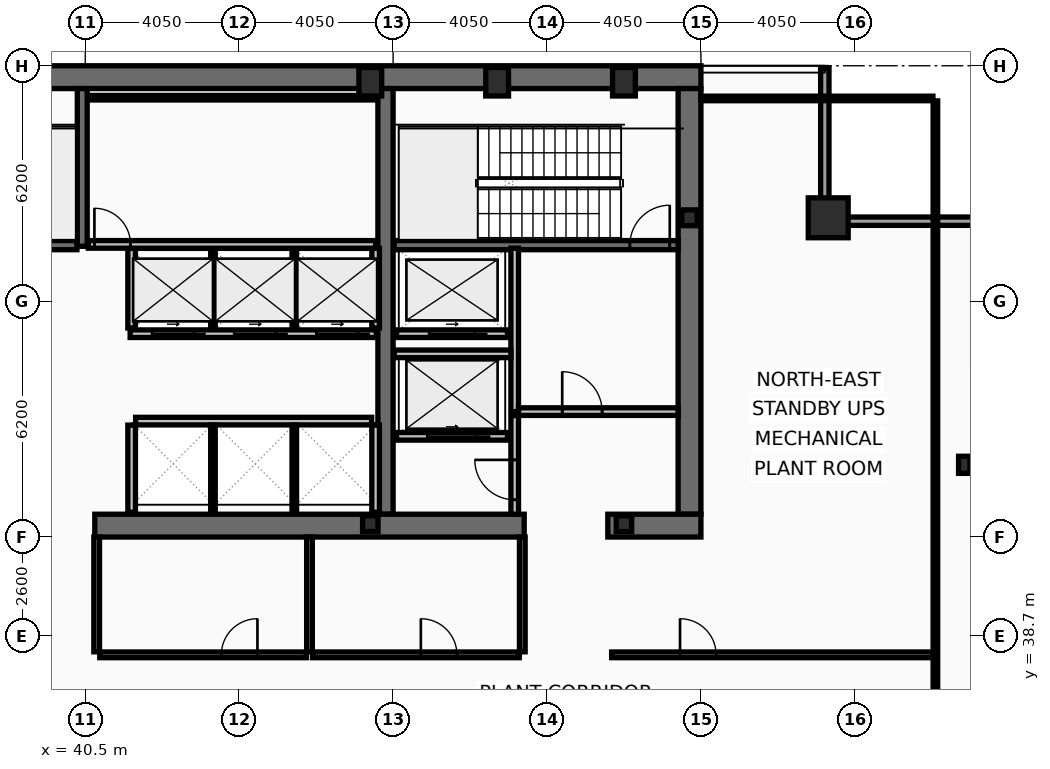
"""IFC4 building model, lengths in metres.
Left out: names, types, materials, properties, quantities, classifications, styles, units other than length and angle.
Written with IfcOpenShell. Run it as: python <this file> out.ifc"""

import sys

from ifc_helpers import new_model, si_unit, direction, frame, frame_2d, origin, origin_2d, place, context, subcontext, project, spatial, rectangle, hollow_rectangle, i_section, extrude, element, fill, save


model = new_model("IFC4")
c1 = context("Model", 3, precision=1e-05, world=origin(), true_north=direction((0.0, 1.0)))
c2 = subcontext(c1, "Body", "Model", "MODEL_VIEW")
j1 = project(units=[si_unit("LENGTHUNIT", "METRE"), si_unit("PLANEANGLEUNIT", "RADIAN")], contexts=[c1])
p1 = place(None, origin())
s1 = spatial("IfcSite", under=j1, at=p1, CompositionType="ELEMENT")
p2 = place(p1, origin())
s2 = spatial("IfcBuilding", under=s1, at=p2, CompositionType="ELEMENT")
p3 = place(p2, frame((0.0, 0.0, 257.0)))
s3 = spatial("IfcBuildingStorey", under=s2, at=p3, CompositionType="ELEMENT", Elevation=257.0)
p4 = place(p3, frame((16.2, 53.4, 0.0), z_axis=(0.0, 0.0, 1.0), x_axis=(1.0, 0.0, 0.0)))
e1 = element("IfcWall", 1, at=p4, inside=s3, PredefinedType="SHEAR", context=c2, shape_type="SweptSolid", body=[
    extrude(rectangle(XDim=40.5, YDim=0.6, at=frame_2d((20.25, 0.0))), origin(), (0.0, 0.0, 1.0), 4.64),
])
p5 = place(p3, frame((56.4, 53.1, 0.0), z_axis=(0.0, 0.0, 1.0), x_axis=(0.0, -1.0, 0.0)))
e2 = element("IfcWall", 2, at=p5, inside=s3, PredefinedType="SHEAR", context=c2, shape_type="SweptSolid", body=[
    extrude(rectangle(XDim=11.2, YDim=0.6, at=frame_2d((5.6, 0.0))), origin(), (0.0, 0.0, 1.0), 4.64),
])
p6 = place(p3, frame((48.4, 41.9, 0.0), z_axis=(0.0, 0.0, 1.0), x_axis=(0.0, 1.0, 0.0)))
e3 = element("IfcWall", 3, at=p6, inside=s3, PredefinedType="SHEAR", context=c2, shape_type="SweptSolid", body=[
    extrude(rectangle(XDim=11.2, YDim=0.4, at=frame_2d((5.6, 0.0))), origin(), (0.0, 0.0, 1.0), 4.64),
])
p7 = place(p3, frame((52.05, 41.6, 0.0), z_axis=(0.0, 0.0, 1.0), x_axis=(-1.0, 0.0, 0.0)))
e4 = element("IfcWall", 4, at=p7, inside=s3, PredefinedType="SHEAR", context=c2, shape_type="SweptSolid", body=[
    extrude(rectangle(XDim=11.3, YDim=0.6, at=frame_2d((5.65, 0.0))), origin(), (0.0, 0.0, 1.0), 4.64),
])
p8 = place(p3, frame((56.7, 41.6, 0.0), z_axis=(0.0, 0.0, 1.0), x_axis=(-1.0, 0.0, 0.0)))
e5 = element("IfcWall", 5, at=p8, inside=s3, PredefinedType="SHEAR", context=c2, shape_type="SweptSolid", body=[
    extrude(rectangle(XDim=2.45, YDim=0.6, at=frame_2d((1.225, 0.0))), origin(), (0.0, 0.0, 1.0), 4.64),
])
p9 = place(p3, frame((40.42, 48.95, 0.0), z_axis=(0.0, 0.0, 1.0), x_axis=(0.0, 1.0, 0.0)))
e6 = element("IfcWall", 6, at=p9, inside=s3, PredefinedType="SHEAR", context=c2, shape_type="SweptSolid", body=[
    extrude(rectangle(XDim=4.15, YDim=0.26, at=frame_2d((2.075, 0.0))), origin(), (0.0, 0.0, 1.0), 4.64),
])
p10 = place(p3, frame((48.63, 48.98, 0.0), z_axis=(0.0, 0.0, 1.0), x_axis=(1.0, 0.0, 0.0)))
e7 = element("IfcWall", 7, at=p10, inside=s3, PredefinedType="SHEAR", context=c2, shape_type="SweptSolid", body=[
    extrude(rectangle(XDim=7.47, YDim=0.24, at=frame_2d((3.735, 0.0))), origin(), (0.0, 0.0, 1.0), 4.64),
])
p11 = place(p10, frame((6.2, 0.0, 0.0)))
e8 = element("IfcOpeningElement", 8, at=p11, cuts=e7, PredefinedType="OPENING", context=c2, shape_type="SweptSolid", body=[
    extrude(rectangle(XDim=1.05, YDim=2.15, at=frame_2d((0.525, 1.075))), frame((0.0, 0.13, 0.0), z_axis=(0.0, -1.0, 0.0), x_axis=(1.0, 0.0, 0.0)), (0.0, 0.0, 1.0), 0.26),
])
p12 = place(p3, frame((32.72, 48.98, 0.0), z_axis=(0.0, 0.0, 1.0), x_axis=(1.0, 0.0, 0.0)))
e9 = element("IfcWall", 9, at=p12, inside=s3, PredefinedType="SHEAR", context=c2, shape_type="SweptSolid", body=[
    extrude(rectangle(XDim=7.56, YDim=0.24, at=frame_2d((3.78, 0.0))), origin(), (0.0, 0.0, 1.0), 4.64),
])
p13 = place(p12, frame((0.22, 0.0, 0.0)))
e10 = element("IfcOpeningElement", 10, at=p13, cuts=e9, PredefinedType="OPENING", context=c2, shape_type="SweptSolid", body=[
    extrude(rectangle(XDim=1.05, YDim=2.15, at=frame_2d((0.525, 1.075))), frame((0.0, 0.13, 0.0), z_axis=(0.0, -1.0, 0.0), x_axis=(1.0, 0.0, 0.0)), (0.0, 0.0, 1.0), 0.26),
])
p14 = place(p3, frame((60.05, 49.7, 0.0), z_axis=(0.0, 0.0, 1.0), x_axis=(1.0, 0.0, 0.0)))
e11 = element("IfcColumn", 11, at=p14, inside=s3, PredefinedType="COLUMN", context=c2, shape_type="SweptSolid", body=[
    extrude(hollow_rectangle(XDim=1.05, YDim=1.05, WallThickness=0.055, at=origin_2d()), origin(), (0.0, 0.0, 1.0), 4.8),
])
for number, where, z_axis, x_axis in (
    (12, (48.0, 53.28, 0.0), (0.0, 0.0, 1.0), (1.0, 0.0, 0.0)),
    (13, (51.337, 53.28, 0.0), (0.0, 0.0, 1.0), (1.0, 0.0, 0.0)),
    (14, (54.675, 53.28, 0.0), (0.0, 0.0, 1.0), (1.0, 0.0, 0.0)),
):
    element("IfcColumn", number, at=place(p3, frame(where, z_axis=z_axis, x_axis=x_axis)), inside=s3, PredefinedType="COLUMN", context=c2, shape_type="SweptSolid", body=[
        extrude(hollow_rectangle(XDim=0.6, YDim=0.75, WallThickness=0.045, at=origin_2d()), origin(), (0.0, 0.0, 1.0), 4.8),
    ])
p15 = place(p3, frame((63.63, 43.2, 0.0), z_axis=(0.0, 0.0, 1.0), x_axis=(1.0, 0.0, 0.0)))
e15 = element("IfcColumn", 15, at=p15, inside=s3, PredefinedType="COLUMN", context=c2, shape_type="SweptSolid", body=[
    extrude(i_section(OverallWidth=0.3, OverallDepth=0.45, WebThickness=0.014, FlangeThickness=0.026, at=origin_2d()), origin(), (0.0, 0.0, 1.0), 4.8),
])
for number, where, z_axis, x_axis in (
    (16, (56.4, 49.7, 0.0), (0.0, 0.0, 1.0), (1.0, 0.0, 0.0)),
    (17, (48.0, 41.65, 0.0), (0.0, 0.0, 1.0), (1.0, 0.0, 0.0)),
    (18, (54.675, 41.65, 0.0), (0.0, 0.0, 1.0), (1.0, 0.0, 0.0)),
):
    element("IfcColumn", number, at=place(p3, frame(where, z_axis=z_axis, x_axis=x_axis)), inside=s3, PredefinedType="COLUMN", context=c2, shape_type="SweptSolid", body=[
        extrude(i_section(OverallWidth=0.406, OverallDepth=0.416, WebThickness=0.03, FlangeThickness=0.048, at=origin_2d()), origin(), (0.0, 0.0, 1.0), 4.8),
    ])
p16 = place(p3, frame((59.96, 53.63, 0.0), z_axis=(0.0, 0.0, 1.0), x_axis=(0.0, -1.0, 0.0)))
e19 = element("IfcWall", 19, at=p16, inside=s3, PredefinedType="SOLIDWALL", context=c2, shape_type="SweptSolid", body=[
    extrude(rectangle(XDim=3.91, YDim=0.22, at=frame_2d((1.955, 0.0))), origin(), (0.0, 0.0, 1.0), 4.03),
])
p17 = place(p3, frame((59.85, 49.61, 0.0), z_axis=(0.0, 0.0, 1.0), x_axis=(1.0, 0.0, 0.0)))
e20 = element("IfcWall", 20, at=p17, inside=s3, PredefinedType="SOLIDWALL", context=c2, shape_type="SweptSolid", body=[
    extrude(rectangle(XDim=4.22, YDim=0.22, at=frame_2d((2.11, 0.0))), origin(), (0.0, 0.0, 1.0), 4.03),
])
p18 = place(p3, frame((51.61, 43.95, 0.0), z_axis=(0.0, 0.0, 1.0), x_axis=(-1.0, 0.0, 0.0)))
e21 = element("IfcWall", 21, at=p18, inside=s3, PredefinedType="PARTITIONING", context=c2, shape_type="SweptSolid", body=[
    extrude(rectangle(XDim=2.92, YDim=0.2, at=frame_2d((1.46, 0.0))), origin(), (0.0, 0.0, 1.0), 4.64),
])
p19 = place(p18, frame((0.81, 0.0, 0.0)))
e22 = element("IfcOpeningElement", 22, at=p19, cuts=e21, PredefinedType="OPENING", context=c2, shape_type="SweptSolid", body=[
    extrude(rectangle(XDim=1.3, YDim=2.18, at=frame_2d((0.65, 1.09))), frame((0.0, 0.11, 0.0), z_axis=(0.0, -1.0, 0.0), x_axis=(1.0, 0.0, 0.0)), (0.0, 0.0, 1.0), 0.22),
])
p20 = place(p3, frame((51.61, 46.65, 0.0), z_axis=(0.0, 0.0, 1.0), x_axis=(-1.0, 0.0, 0.0)))
e23 = element("IfcWall", 23, at=p20, inside=s3, PredefinedType="PARTITIONING", context=c2, shape_type="SweptSolid", body=[
    extrude(rectangle(XDim=2.92, YDim=0.2, at=frame_2d((1.46, 0.0))), origin(), (0.0, 0.0, 1.0), 4.64),
])
p21 = place(p20, frame((0.86, 0.0, 0.0)))
e24 = element("IfcOpeningElement", 24, at=p21, cuts=e23, PredefinedType="OPENING", context=c2, shape_type="SweptSolid", body=[
    extrude(rectangle(XDim=1.2, YDim=2.18, at=frame_2d((0.6, 1.09))), frame((0.0, 0.11, 0.0), z_axis=(0.0, -1.0, 0.0), x_axis=(1.0, 0.0, 0.0)), (0.0, 0.0, 1.0), 0.22),
])
p22 = place(p3, frame((48.16, 46.65, 0.0), z_axis=(0.0, 0.0, 1.0), x_axis=(-1.0, 0.0, 0.0)))
e25 = element("IfcWall", 25, at=p22, inside=s3, PredefinedType="PARTITIONING", context=c2, shape_type="SweptSolid", body=[
    extrude(rectangle(XDim=6.48, YDim=0.2, at=frame_2d((3.24, 0.0))), origin(), (0.0, 0.0, 1.0), 4.64),
])
p23 = place(p22, frame((4.8, 0.0, 0.0)))
e26 = element("IfcOpeningElement", 26, at=p23, cuts=e25, PredefinedType="OPENING", context=c2, shape_type="SweptSolid", body=[
    extrude(rectangle(XDim=1.1, YDim=2.18, at=frame_2d((0.55, 1.09))), frame((0.0, 0.11, 0.0), z_axis=(0.0, -1.0, 0.0), x_axis=(1.0, 0.0, 0.0)), (0.0, 0.0, 1.0), 0.22),
])
p24 = place(p22, frame((2.64, 0.0, 0.0)))
e27 = element("IfcOpeningElement", 27, at=p24, cuts=e25, PredefinedType="OPENING", context=c2, shape_type="SweptSolid", body=[
    extrude(rectangle(XDim=1.1, YDim=2.18, at=frame_2d((0.55, 1.09))), frame((0.0, 0.11, 0.0), z_axis=(0.0, -1.0, 0.0), x_axis=(1.0, 0.0, 0.0)), (0.0, 0.0, 1.0), 0.22),
])
p25 = place(p22, frame((0.48, 0.0, 0.0)))
e28 = element("IfcOpeningElement", 28, at=p25, cuts=e25, PredefinedType="OPENING", context=c2, shape_type="SweptSolid", body=[
    extrude(rectangle(XDim=1.1, YDim=2.18, at=frame_2d((0.55, 1.09))), frame((0.0, 0.11, 0.0), z_axis=(0.0, -1.0, 0.0), x_axis=(1.0, 0.0, 0.0)), (0.0, 0.0, 1.0), 0.22),
])
p26 = place(p3, frame((51.8, 44.6, 0.0), z_axis=(0.0, 0.0, 1.0), x_axis=(0.0, 1.0, 0.0)))
e29 = element("IfcWall", 29, at=p26, inside=s3, PredefinedType="PARTITIONING", context=c2, shape_type="SweptSolid", body=[
    extrude(rectangle(XDim=4.3, YDim=0.2, at=frame_2d((2.15, 0.0))), origin(), (0.0, 0.0, 1.0), 4.64),
])
p27 = place(p3, frame((51.9, 44.6, 0.0), z_axis=(0.0, 0.0, 1.0), x_axis=(1.0, 0.0, 0.0)))
e30 = element("IfcWall", 30, at=p27, inside=s3, PredefinedType="PARTITIONING", context=c2, shape_type="SweptSolid", body=[
    extrude(rectangle(XDim=4.2, YDim=0.2, at=frame_2d((2.1, 0.0))), origin(), (0.0, 0.0, 1.0), 4.64),
])
p28 = place(p27, frame((1.15, 0.0, 0.0)))
e31 = element("IfcOpeningElement", 31, at=p28, cuts=e30, PredefinedType="OPENING", context=c2, shape_type="SweptSolid", body=[
    extrude(rectangle(XDim=1.05, YDim=2.15, at=frame_2d((0.525, 1.075))), frame((0.0, 0.11, 0.0), z_axis=(0.0, -1.0, 0.0), x_axis=(1.0, 0.0, 0.0)), (0.0, 0.0, 1.0), 0.22),
])
p29 = place(p3, frame((48.63, 46.12, 0.0), z_axis=(0.0, 0.0, 1.0), x_axis=(1.0, 0.0, 0.0)))
e32 = element("IfcWall", 32, at=p29, inside=s3, PredefinedType="PARTITIONING", context=c2, shape_type="SweptSolid", body=[
    extrude(rectangle(XDim=3.07, YDim=0.2, at=frame_2d((1.535, 0.0))), origin(), (0.0, 0.0, 1.0), 4.64),
])
p30 = place(p3, frame((51.8, 41.9, 0.0), z_axis=(0.0, 0.0, 1.0), x_axis=(0.0, 1.0, 0.0)))
e33 = element("IfcWall", 33, at=p30, inside=s3, PredefinedType="PARTITIONING", context=c2, shape_type="SweptSolid", body=[
    extrude(rectangle(XDim=2.595, YDim=0.2, at=frame_2d((1.298, 0.0))), origin(), (0.0, 0.0, 1.0), 4.64),
])
p31 = place(p30, frame((0.38, 0.0, 0.0)))
e34 = element("IfcOpeningElement", 34, at=p31, cuts=e33, PredefinedType="OPENING", context=c2, shape_type="SweptSolid", body=[
    extrude(rectangle(XDim=1.05, YDim=2.15, at=frame_2d((0.525, 1.075))), frame((0.0, 0.11, 0.0), z_axis=(0.0, -1.0, 0.0), x_axis=(1.0, 0.0, 0.0)), (0.0, 0.0, 1.0), 0.22),
])
for number, where, z_axis, x_axis in (
    (35, (41.72, 46.8, 0.0), (0.0, 0.0, 1.0), (0.0, 1.0, 0.0)),
    (36, (48.14, 46.8, 0.0), (0.0, 0.0, 1.0), (0.0, 1.0, 0.0)),
):
    element("IfcWall", number, at=place(p3, frame(where, z_axis=z_axis, x_axis=x_axis)), inside=s3, PredefinedType="PARTITIONING", context=c2, shape_type="SweptSolid", body=[
        extrude(rectangle(XDim=2.095, YDim=0.2, at=frame_2d((1.047, 0.0))), origin(), (0.0, 0.0, 1.0), 4.64),
    ])
for number, where, z_axis, x_axis in (
    (37, (43.86, 46.8, 0.0), (0.0, 0.0, 1.0), (0.0, 1.0, 0.0)),
    (38, (46.0, 46.8, 0.0), (0.0, 0.0, 1.0), (0.0, 1.0, 0.0)),
):
    element("IfcWall", number, at=place(p3, frame(where, z_axis=z_axis, x_axis=x_axis)), inside=s3, PredefinedType="PARTITIONING", context=c2, shape_type="SweptSolid", body=[
        extrude(rectangle(XDim=2.095, YDim=0.12, at=frame_2d((1.047, 0.0))), origin(), (0.0, 0.0, 1.0), 4.64),
    ])
p32 = place(p3, frame((41.825, 44.35, 0.0), z_axis=(0.0, 0.0, 1.0), x_axis=(1.0, 0.0, 0.0)))
e39 = element("IfcWall", 39, at=p32, inside=s3, PredefinedType="PARTITIONING", context=c2, shape_type="SweptSolid", body=[
    extrude(rectangle(XDim=6.21, YDim=0.2, at=frame_2d((3.105, 0.0))), origin(), (0.0, 0.0, 1.0), 4.64),
])
for number, where, z_axis, x_axis in (
    (40, (41.72, 41.95, 0.0), (0.0, 0.0, 1.0), (0.0, 1.0, 0.0)),
    (41, (48.14, 41.95, 0.0), (0.0, 0.0, 1.0), (0.0, 1.0, 0.0)),
):
    element("IfcWall", number, at=place(p3, frame(where, z_axis=z_axis, x_axis=x_axis)), inside=s3, PredefinedType="PARTITIONING", context=c2, shape_type="SweptSolid", body=[
        extrude(rectangle(XDim=2.295, YDim=0.2, at=frame_2d((1.147, 0.0))), origin(), (0.0, 0.0, 1.0), 4.64),
    ])
for number, where, z_axis, x_axis in (
    (42, (43.86, 41.95, 0.0), (0.0, 0.0, 1.0), (0.0, 1.0, 0.0)),
    (43, (46.0, 41.95, 0.0), (0.0, 0.0, 1.0), (0.0, 1.0, 0.0)),
):
    element("IfcWall", number, at=place(p3, frame(where, z_axis=z_axis, x_axis=x_axis)), inside=s3, PredefinedType="PARTITIONING", context=c2, shape_type="SweptSolid", body=[
        extrude(rectangle(XDim=2.295, YDim=0.12, at=frame_2d((1.147, 0.0))), origin(), (0.0, 0.0, 1.0), 4.64),
    ])
p33 = place(p3, frame((40.58, 52.86, 0.0), z_axis=(0.0, 0.0, 1.0), x_axis=(1.0, 0.0, 0.0)))
e44 = element("IfcWall", 44, at=p33, inside=s3, PredefinedType="PARTITIONING", context=c2, shape_type="SweptSolid", body=[
    extrude(rectangle(XDim=7.56, YDim=0.12, at=frame_2d((3.78, 0.0))), origin(), (0.0, 0.0, 1.0), 4.64),
])
p34 = place(p3, frame((40.58, 49.0, 0.0), z_axis=(0.0, 0.0, 1.0), x_axis=(1.0, 0.0, 0.0)))
e45 = element("IfcWall", 45, at=p34, inside=s3, PredefinedType="PARTITIONING", context=c2, shape_type="SweptSolid", body=[
    extrude(rectangle(XDim=7.56, YDim=0.2, at=frame_2d((3.78, 0.0))), origin(), (0.0, 0.0, 1.0), 4.64),
])
p35 = place(p34, frame((0.16, 0.0, 0.0)))
e46 = element("IfcOpeningElement", 46, at=p35, cuts=e45, PredefinedType="OPENING", context=c2, shape_type="SweptSolid", body=[
    extrude(rectangle(XDim=0.95, YDim=2.1, at=frame_2d((0.475, 1.05))), frame((0.0, 0.11, 0.0), z_axis=(0.0, -1.0, 0.0), x_axis=(1.0, 0.0, 0.0)), (0.0, 0.0, 1.0), 0.22),
])
p36 = place(p3, frame((40.88, 38.2, 0.0), z_axis=(0.0, 0.0, 1.0), x_axis=(1.0, 0.0, 0.0)))
e47 = element("IfcWall", 47, at=p36, inside=s3, PredefinedType="PARTITIONING", context=c2, shape_type="SweptSolid", body=[
    extrude(rectangle(XDim=5.44, YDim=0.15, at=frame_2d((2.72, 0.0))), origin(), (0.0, 0.0, 1.0), 3.98),
])
p37 = place(p36, frame((3.2, 0.0, 0.0)))
e48 = element("IfcOpeningElement", 48, at=p37, cuts=e47, PredefinedType="OPENING", context=c2, shape_type="SweptSolid", body=[
    extrude(rectangle(XDim=0.95, YDim=2.1, at=frame_2d((0.475, 1.05))), frame((0.0, 0.085, 0.0), z_axis=(0.0, -1.0, 0.0), x_axis=(1.0, 0.0, 0.0)), (0.0, 0.0, 1.0), 0.17),
])
p38 = place(p3, frame((46.48, 38.2, 0.0), z_axis=(0.0, 0.0, 1.0), x_axis=(1.0, 0.0, 0.0)))
e49 = element("IfcWall", 49, at=p38, inside=s3, PredefinedType="PARTITIONING", context=c2, shape_type="SweptSolid", body=[
    extrude(rectangle(XDim=5.44, YDim=0.15, at=frame_2d((2.72, 0.0))), origin(), (0.0, 0.0, 1.0), 3.98),
])
p39 = place(p38, frame((2.85, 0.0, 0.0)))
e50 = element("IfcOpeningElement", 50, at=p39, cuts=e49, PredefinedType="OPENING", context=c2, shape_type="SweptSolid", body=[
    extrude(rectangle(XDim=0.95, YDim=2.1, at=frame_2d((0.475, 1.05))), frame((0.0, 0.085, 0.0), z_axis=(0.0, -1.0, 0.0), x_axis=(1.0, 0.0, 0.0)), (0.0, 0.0, 1.0), 0.17),
])
for number, where, z_axis, x_axis in (
    (51, (40.8, 38.28, 0.0), (0.0, 0.0, 1.0), (0.0, 1.0, 0.0)),
    (52, (46.4, 38.28, 0.0), (0.0, 0.0, 1.0), (0.0, 1.0, 0.0)),
    (53, (52.0, 38.28, 0.0), (0.0, 0.0, 1.0), (0.0, 1.0, 0.0)),
):
    element("IfcWall", number, at=place(p3, frame(where, z_axis=z_axis, x_axis=x_axis)), inside=s3, PredefinedType="PARTITIONING", context=c2, shape_type="SweptSolid", body=[
        extrude(rectangle(XDim=3.02, YDim=0.15, at=frame_2d((1.51, 0.0))), origin(), (0.0, 0.0, 1.0), 4.64),
    ])
p40 = place(p3, frame((54.35, 38.2, 0.0), z_axis=(0.0, 0.0, 1.0), x_axis=(1.0, 0.0, 0.0)))
e54 = element("IfcWall", 54, at=p40, inside=s3, PredefinedType="PARTITIONING", context=c2, shape_type="SweptSolid", body=[
    extrude(rectangle(XDim=8.455, YDim=0.15, at=frame_2d((4.228, 0.0))), origin(), (0.0, 0.0, 1.0), 3.98),
])
p41 = place(p40, frame((1.8, 0.0, 0.0)))
e55 = element("IfcOpeningElement", 55, at=p41, cuts=e54, PredefinedType="OPENING", context=c2, shape_type="SweptSolid", body=[
    extrude(rectangle(XDim=0.95, YDim=2.1, at=frame_2d((0.475, 1.05))), frame((0.0, 0.085, 0.0), z_axis=(0.0, -1.0, 0.0), x_axis=(1.0, 0.0, 0.0)), (0.0, 0.0, 1.0), 0.17),
])
p42 = place(p3, frame((62.87, 10.665, 0.0), z_axis=(0.0, 0.0, 1.0), x_axis=(0.0, 1.0, 0.0)))
e56 = element("IfcWall", 56, at=p42, inside=s3, PredefinedType="PARTITIONING", context=c2, shape_type="SweptSolid", body=[
    extrude(rectangle(XDim=42.11, YDim=0.12, at=frame_2d((21.055, 0.0))), origin(), (0.0, 0.0, 1.0), 3.98),
])
p43 = place(p3, frame((56.7, 52.84, 0.0), z_axis=(0.0, 0.0, 1.0), x_axis=(1.0, 0.0, 0.0)))
e57 = element("IfcWall", 57, at=p43, inside=s3, PredefinedType="PARTITIONING", context=c2, shape_type="SweptSolid", body=[
    extrude(rectangle(XDim=6.105, YDim=0.12, at=frame_2d((3.052, 0.0))), origin(), (0.0, 0.0, 1.0), 4.64),
])
p44 = place(p11, origin())
e58 = element("IfcDoor", 58, at=p44, inside=s3, OperationType="SINGLE_SWING_RIGHT", PredefinedType="DOOR", context=c2, shape_type="SweptSolid", body=[
    extrude(rectangle(XDim=1.05, YDim=2.15, at=frame_2d((0.525, 1.075))), frame((0.0, 0.025, 0.0), z_axis=(0.0, -1.0, 0.0), x_axis=(1.0, 0.0, 0.0)), (0.0, 0.0, 1.0), 0.05),
])
fill(e8, e58)
p45 = place(p19, origin())
e59 = element("IfcDoor", 59, at=p45, inside=s3, OperationType="SLIDING_TO_LEFT", PredefinedType="DOOR", context=c2, shape_type="SweptSolid", body=[
    extrude(rectangle(XDim=1.3, YDim=2.18, at=frame_2d((0.65, 1.09))), frame((0.0, 0.025, 0.0), z_axis=(0.0, -1.0, 0.0), x_axis=(1.0, 0.0, 0.0)), (0.0, 0.0, 1.0), 0.05),
])
fill(e22, e59)
p46 = place(p21, origin())
e60 = element("IfcDoor", 60, at=p46, inside=s3, OperationType="SLIDING_TO_LEFT", PredefinedType="DOOR", context=c2, shape_type="SweptSolid", body=[
    extrude(rectangle(XDim=1.2, YDim=2.18, at=frame_2d((0.6, 1.09))), frame((0.0, 0.025, 0.0), z_axis=(0.0, -1.0, 0.0), x_axis=(1.0, 0.0, 0.0)), (0.0, 0.0, 1.0), 0.05),
])
fill(e24, e60)
p47 = place(p23, origin())
e61 = element("IfcDoor", 61, at=p47, inside=s3, OperationType="SLIDING_TO_LEFT", PredefinedType="DOOR", context=c2, shape_type="SweptSolid", body=[
    extrude(rectangle(XDim=1.1, YDim=2.18, at=frame_2d((0.55, 1.09))), frame((0.0, 0.025, 0.0), z_axis=(0.0, -1.0, 0.0), x_axis=(1.0, 0.0, 0.0)), (0.0, 0.0, 1.0), 0.05),
])
fill(e26, e61)
p48 = place(p24, origin())
e62 = element("IfcDoor", 62, at=p48, inside=s3, OperationType="SLIDING_TO_LEFT", PredefinedType="DOOR", context=c2, shape_type="SweptSolid", body=[
    extrude(rectangle(XDim=1.1, YDim=2.18, at=frame_2d((0.55, 1.09))), frame((0.0, 0.025, 0.0), z_axis=(0.0, -1.0, 0.0), x_axis=(1.0, 0.0, 0.0)), (0.0, 0.0, 1.0), 0.05),
])
fill(e27, e62)
p49 = place(p25, origin())
e63 = element("IfcDoor", 63, at=p49, inside=s3, OperationType="SLIDING_TO_LEFT", PredefinedType="DOOR", context=c2, shape_type="SweptSolid", body=[
    extrude(rectangle(XDim=1.1, YDim=2.18, at=frame_2d((0.55, 1.09))), frame((0.0, 0.025, 0.0), z_axis=(0.0, -1.0, 0.0), x_axis=(1.0, 0.0, 0.0)), (0.0, 0.0, 1.0), 0.05),
])
fill(e28, e63)
p50 = place(p28, origin())
e64 = element("IfcDoor", 64, at=p50, inside=s3, OperationType="SINGLE_SWING_LEFT", PredefinedType="DOOR", context=c2, shape_type="SweptSolid", body=[
    extrude(rectangle(XDim=1.05, YDim=2.15, at=frame_2d((0.525, 1.075))), frame((0.0, 0.025, 0.0), z_axis=(0.0, -1.0, 0.0), x_axis=(1.0, 0.0, 0.0)), (0.0, 0.0, 1.0), 0.05),
])
fill(e31, e64)
p51 = place(p31, origin())
e65 = element("IfcDoor", 65, at=p51, inside=s3, OperationType="SINGLE_SWING_RIGHT", PredefinedType="DOOR", context=c2, shape_type="SweptSolid", body=[
    extrude(rectangle(XDim=1.05, YDim=2.15, at=frame_2d((0.525, 1.075))), frame((0.0, 0.025, 0.0), z_axis=(0.0, -1.0, 0.0), x_axis=(1.0, 0.0, 0.0)), (0.0, 0.0, 1.0), 0.05),
])
fill(e34, e65)
p52 = place(p35, origin())
e66 = element("IfcDoor", 66, at=p52, inside=s3, OperationType="SINGLE_SWING_LEFT", PredefinedType="DOOR", context=c2, shape_type="SweptSolid", body=[
    extrude(rectangle(XDim=0.95, YDim=2.1, at=frame_2d((0.475, 1.05))), frame((0.0, 0.025, 0.0), z_axis=(0.0, -1.0, 0.0), x_axis=(1.0, 0.0, 0.0)), (0.0, 0.0, 1.0), 0.05),
])
fill(e46, e66)
p53 = place(p37, origin())
e67 = element("IfcDoor", 67, at=p53, inside=s3, OperationType="SINGLE_SWING_RIGHT", PredefinedType="DOOR", context=c2, shape_type="SweptSolid", body=[
    extrude(rectangle(XDim=0.95, YDim=2.1, at=frame_2d((0.475, 1.05))), frame((0.0, 0.025, 0.0), z_axis=(0.0, -1.0, 0.0), x_axis=(1.0, 0.0, 0.0)), (0.0, 0.0, 1.0), 0.05),
])
fill(e48, e67)
p54 = place(p39, origin())
e68 = element("IfcDoor", 68, at=p54, inside=s3, OperationType="SINGLE_SWING_LEFT", PredefinedType="DOOR", context=c2, shape_type="SweptSolid", body=[
    extrude(rectangle(XDim=0.95, YDim=2.1, at=frame_2d((0.475, 1.05))), frame((0.0, 0.025, 0.0), z_axis=(0.0, -1.0, 0.0), x_axis=(1.0, 0.0, 0.0)), (0.0, 0.0, 1.0), 0.05),
])
fill(e50, e68)
p55 = place(p41, origin())
e69 = element("IfcDoor", 69, at=p55, inside=s3, OperationType="SINGLE_SWING_LEFT", PredefinedType="DOOR", context=c2, shape_type="SweptSolid", body=[
    extrude(rectangle(XDim=0.95, YDim=2.1, at=frame_2d((0.475, 1.05))), frame((0.0, 0.025, 0.0), z_axis=(0.0, -1.0, 0.0), x_axis=(1.0, 0.0, 0.0)), (0.0, 0.0, 1.0), 0.05),
])
fill(e55, e69)
save(model, sys.argv[1])
